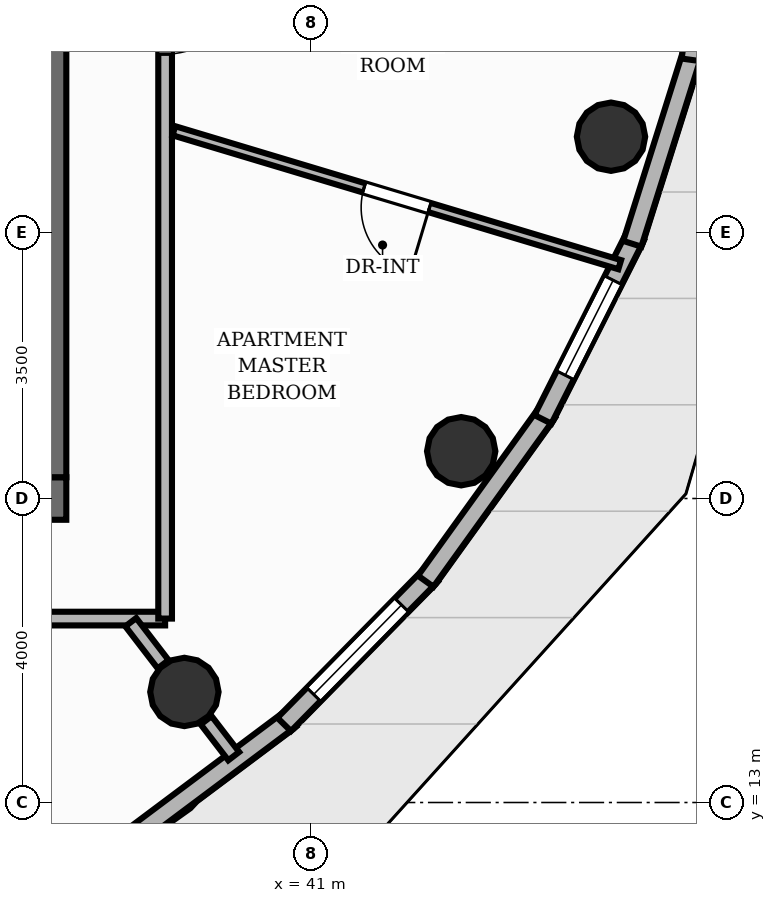
"""IFC4 building model, lengths in metres.
Left out: names, types, materials, properties, quantities, classifications, styles, units other than length and angle.
Written with IfcOpenShell. Run it as: python <this file> out.ifc"""

import sys

from ifc_helpers import new_model, si_unit, direction, frame, frame_2d, origin, origin_2d, place, context, subcontext, project, spatial, rectangle, circle, extrude, element, fill, save


model = new_model("IFC4")
c1 = context("Model", 3, precision=1e-05, world=origin(), true_north=direction((0.0, 1.0)))
c2 = subcontext(c1, "Body", "Model", "MODEL_VIEW")
j1 = project(units=[si_unit("LENGTHUNIT", "METRE"), si_unit("PLANEANGLEUNIT", "RADIAN")], contexts=[c1])
p1 = place(None, origin())
s1 = spatial("IfcSite", under=j1, at=p1, CompositionType="ELEMENT")
p2 = place(p1, origin())
s2 = spatial("IfcBuilding", under=s1, at=p2, CompositionType="ELEMENT")
p3 = place(p2, frame((0.0, 0.0, 169.44)))
s3 = spatial("IfcBuildingStorey", under=s2, at=p3, CompositionType="ELEMENT", Elevation=169.44)
p4 = place(p3, frame((26.22, 17.0, 0.0), z_axis=(0.0, 0.0, 1.0), x_axis=(1.0, 0.0, 0.0)))
e1 = element("IfcWall", 1, at=p4, inside=s3, PredefinedType="SHEAR", context=c2, shape_type="SweptSolid", body=[
    extrude(rectangle(XDim=11.56, YDim=0.56, at=frame_2d((5.78, 0.0))), origin(), (0.0, 0.0, 1.0), 3.2),
])
p5 = place(p4, frame((2.28, 0.0, 0.0)))
e2 = element("IfcOpeningElement", 2, at=p5, cuts=e1, PredefinedType="OPENING", context=c2, shape_type="SweptSolid", body=[
    extrude(rectangle(XDim=1.1, YDim=2.15, at=frame_2d((0.55, 1.075))), frame((0.0, 0.29, 0.0), z_axis=(0.0, -1.0, 0.0), x_axis=(1.0, 0.0, 0.0)), (0.0, 0.0, 1.0), 0.58),
])
p6 = place(p4, frame((5.83, 0.0, 0.0)))
e3 = element("IfcOpeningElement", 3, at=p6, cuts=e1, PredefinedType="OPENING", context=c2, shape_type="SweptSolid", body=[
    extrude(rectangle(XDim=0.9, YDim=2.1, at=frame_2d((0.45, 1.05))), frame((0.0, 0.29, 0.0), z_axis=(0.0, -1.0, 0.0), x_axis=(1.0, 0.0, 0.0)), (0.0, 0.0, 1.0), 0.58),
])
p7 = place(p3, frame((37.5, 17.28, 0.0), z_axis=(0.0, 0.0, 1.0), x_axis=(0.0, 1.0, 0.0)))
e4 = element("IfcWall", 4, at=p7, inside=s3, PredefinedType="SHEAR", context=c2, shape_type="SweptSolid", body=[
    extrude(rectangle(XDim=13.44, YDim=0.56, at=frame_2d((6.72, 0.0))), origin(), (0.0, 0.0, 1.0), 3.2),
])
for number, where, z_axis, x_axis in (
    (5, (39.333, 14.455, 0.0), (0.0, 0.0, 1.0), (1.0, 0.0, 0.0)),
    (6, (42.975, 17.622, 0.0), (0.0, 0.0, 1.0), (1.0, 0.0, 0.0)),
    (7, (44.946, 21.76, 0.0), (0.0, 0.0, 1.0), (1.0, 0.0, 0.0)),
):
    element("IfcColumn", number, at=place(p3, frame(where, z_axis=z_axis, x_axis=x_axis)), inside=s3, PredefinedType="COLUMN", context=c2, shape_type="SweptSolid", body=[
        extrude(circle(Radius=0.45, at=origin_2d()), origin(), (0.0, 0.0, 1.0), 3.2),
    ])
p8 = place(p3, frame((40.728, 14.099, 0.0), z_axis=(0.0, 0.0, 1.0), x_axis=(-0.800636941996, -0.599149803564, 0.0)))
e8 = element("IfcWall", 8, at=p8, inside=s3, PredefinedType="SOLIDWALL", context=c2, shape_type="SweptSolid", body=[
    extrude(rectangle(XDim=2.758, YDim=0.25, at=frame_2d((1.379, 0.0))), origin(), (0.0, 0.0, 1.0), 2.96),
])
p9 = place(p3, frame((42.579, 15.995, 0.0), z_axis=(0.0, 0.0, 1.0), x_axis=(-0.700794099323, -0.713363603189, 0.0)))
e9 = element("IfcWall", 9, at=p9, inside=s3, PredefinedType="SOLIDWALL", context=c2, shape_type="SweptSolid", body=[
    extrude(rectangle(XDim=2.758, YDim=0.25, at=frame_2d((1.379, 0.0))), origin(), (0.0, 0.0, 1.0), 2.96),
])
p10 = place(p9, frame((0.554, 0.0, 0.85)))
e10 = element("IfcOpeningElement", 10, at=p10, cuts=e9, PredefinedType="OPENING", context=c2, shape_type="SweptSolid", body=[
    extrude(rectangle(XDim=1.65, YDim=1.55, at=frame_2d((0.825, 0.775))), frame((0.0, 0.135, 0.0), z_axis=(0.0, -1.0, 0.0), x_axis=(1.0, 0.0, 0.0)), (0.0, 0.0, 1.0), 0.27),
])
p11 = place(p3, frame((44.108, 18.135, 0.0), z_axis=(0.0, 0.0, 1.0), x_axis=(-0.583975860001, -0.811771023711, 0.0)))
e11 = element("IfcWall", 11, at=p11, inside=s3, PredefinedType="SOLIDWALL", context=c2, shape_type="SweptSolid", body=[
    extrude(rectangle(XDim=2.738, YDim=0.25, at=frame_2d((1.369, 0.0))), origin(), (0.0, 0.0, 1.0), 2.96),
])
p12 = place(p3, frame((45.268, 20.453, 0.0), z_axis=(0.0, 0.0, 1.0), x_axis=(-0.450391703917, -0.892831066352, 0.0)))
e12 = element("IfcWall", 12, at=p12, inside=s3, PredefinedType="SOLIDWALL", context=c2, shape_type="SweptSolid", body=[
    extrude(rectangle(XDim=2.702, YDim=0.25, at=frame_2d((1.351, 0.0))), origin(), (0.0, 0.0, 1.0), 2.96),
])
p13 = place(p12, frame((0.651, 0.0, 0.85)))
e13 = element("IfcOpeningElement", 13, at=p13, cuts=e12, PredefinedType="OPENING", context=c2, shape_type="SweptSolid", body=[
    extrude(rectangle(XDim=1.4, YDim=1.55, at=frame_2d((0.7, 0.775))), frame((0.0, 0.135, 0.0), z_axis=(0.0, -1.0, 0.0), x_axis=(1.0, 0.0, 0.0)), (0.0, 0.0, 1.0), 0.27),
])
p14 = place(p3, frame((46.024, 22.88, 0.0), z_axis=(0.0, 0.0, 1.0), x_axis=(-0.300796358401, -0.953688392911, 0.0)))
e14 = element("IfcWall", 14, at=p14, inside=s3, PredefinedType="SOLIDWALL", context=c2, shape_type="SweptSolid", body=[
    extrude(rectangle(XDim=2.651, YDim=0.25, at=frame_2d((1.325, 0.0))), origin(), (0.0, 0.0, 1.0), 2.96),
])
p15 = place(p3, frame((46.353, 25.34, 0.0), z_axis=(0.0, 0.0, 1.0), x_axis=(-0.136289981327, -0.990668986589, 0.0)))
e15 = element("IfcWall", 15, at=p15, inside=s3, PredefinedType="SOLIDWALL", context=c2, shape_type="SweptSolid", body=[
    extrude(rectangle(XDim=2.592, YDim=0.25, at=frame_2d((1.296, 0.0))), origin(), (0.0, 0.0, 1.0), 2.96),
])
p16 = place(p15, frame((1.098, 0.0, 0.85)))
e16 = element("IfcOpeningElement", 16, at=p16, cuts=e15, PredefinedType="OPENING", context=c2, shape_type="SweptSolid", body=[
    extrude(rectangle(XDim=0.95, YDim=1.45, at=frame_2d((0.475, 0.725))), frame((0.0, 0.135, 0.0), z_axis=(0.0, -1.0, 0.0), x_axis=(1.0, 0.0, 0.0)), (0.0, 0.0, 1.0), 0.27),
])
p17 = place(p3, frame((39.62, 14.082, 0.0), z_axis=(0.0, 0.0, 1.0), x_axis=(0.609274747308, -0.792959193334, 0.0)))
e17 = element("IfcWall", 17, at=p17, inside=s3, PredefinedType="PARTITIONING", context=c2, shape_type="SweptSolid", body=[
    extrude(rectangle(XDim=0.595, YDim=0.18, at=frame_2d((0.298, 0.0))), origin(), (0.0, 0.0, 1.0), 2.404),
])
p18 = place(p3, frame((39.08, 15.42, 0.0), z_axis=(0.0, 0.0, 1.0), x_axis=(-1.0, 0.0, 0.0)))
e18 = element("IfcWall", 18, at=p18, inside=s3, PredefinedType="PARTITIONING", context=c2, shape_type="SweptSolid", body=[
    extrude(rectangle(XDim=14.16, YDim=0.18, at=frame_2d((7.08, 0.0))), origin(), (0.0, 0.0, 1.0), 2.955),
])
p19 = place(p18, frame((2.007, 0.0, 0.0)))
e19 = element("IfcOpeningElement", 19, at=p19, cuts=e18, PredefinedType="OPENING", context=c2, shape_type="SweptSolid", body=[
    extrude(rectangle(XDim=0.9, YDim=2.1, at=frame_2d((0.45, 1.05))), frame((0.0, 0.1, 0.0), z_axis=(0.0, -1.0, 0.0), x_axis=(1.0, 0.0, 0.0)), (0.0, 0.0, 1.0), 0.2),
])
p20 = place(p18, frame((6.287, 0.0, 0.0)))
e20 = element("IfcOpeningElement", 20, at=p20, cuts=e18, PredefinedType="OPENING", context=c2, shape_type="SweptSolid", body=[
    extrude(rectangle(XDim=0.9, YDim=2.1, at=frame_2d((0.45, 1.05))), frame((0.0, 0.1, 0.0), z_axis=(0.0, -1.0, 0.0), x_axis=(1.0, 0.0, 0.0)), (0.0, 0.0, 1.0), 0.2),
])
p21 = place(p3, frame((39.08, 30.248, 0.0), z_axis=(0.0, 0.0, 1.0), x_axis=(0.0, -1.0, 0.0)))
e21 = element("IfcWall", 21, at=p21, inside=s3, PredefinedType="PARTITIONING", context=c2, shape_type="SweptSolid", body=[
    extrude(rectangle(XDim=14.828, YDim=0.18, at=frame_2d((7.414, 0.0))), origin(), (0.0, 0.0, 1.0), 2.955),
])
p22 = place(p21, frame((6.351, 0.0, 0.0)))
e22 = element("IfcOpeningElement", 22, at=p22, cuts=e21, PredefinedType="OPENING", context=c2, shape_type="SweptSolid", body=[
    extrude(rectangle(XDim=1.05, YDim=2.15, at=frame_2d((0.525, 1.075))), frame((0.0, 0.1, 0.0), z_axis=(0.0, -1.0, 0.0), x_axis=(1.0, 0.0, 0.0)), (0.0, 0.0, 1.0), 0.2),
])
p23 = place(p3, frame((38.628, 15.372, 0.0), z_axis=(0.0, 0.0, 1.0), x_axis=(0.609304996033, -0.792935950635, 0.0)))
e23 = element("IfcWall", 23, at=p23, inside=s3, PredefinedType="PARTITIONING", context=c2, shape_type="SweptSolid", body=[
    extrude(rectangle(XDim=0.698, YDim=0.18, at=frame_2d((0.349, 0.0))), origin(), (0.0, 0.0, 1.0), 2.404),
])
p24 = place(p3, frame((45.061, 20.077, 0.0), z_axis=(0.0, 0.0, 1.0), x_axis=(-0.957731888454, 0.287662353878, 0.0)))
e24 = element("IfcWall", 24, at=p24, inside=s3, PredefinedType="PARTITIONING", context=c2, shape_type="SweptSolid", body=[
    extrude(rectangle(XDim=6.125, YDim=0.125, at=frame_2d((3.062, 0.0))), origin(), (0.0, 0.0, 1.0), 2.692),
])
p25 = place(p24, frame((2.613, 0.0, 0.0)))
e25 = element("IfcOpeningElement", 25, at=p25, cuts=e24, PredefinedType="OPENING", context=c2, shape_type="SweptSolid", body=[
    extrude(rectangle(XDim=0.9, YDim=2.1, at=frame_2d((0.45, 1.05))), frame((0.0, 0.073, 0.0), z_axis=(0.0, -1.0, 0.0), x_axis=(1.0, 0.0, 0.0)), (0.0, 0.0, 1.0), 0.145),
])
p26 = place(p10, origin())
e26 = element("IfcWindow", 26, at=p26, inside=s3, PartitioningType="SINGLE_PANEL", PredefinedType="WINDOW", context=c2, shape_type="SweptSolid", body=[
    extrude(rectangle(XDim=1.65, YDim=1.55, at=frame_2d((0.825, 0.775))), frame((0.0, 0.03, 0.0), z_axis=(0.0, -1.0, 0.0), x_axis=(1.0, 0.0, 0.0)), (0.0, 0.0, 1.0), 0.06),
])
fill(e10, e26)
p27 = place(p13, origin())
e27 = element("IfcWindow", 27, at=p27, inside=s3, PartitioningType="SINGLE_PANEL", PredefinedType="WINDOW", context=c2, shape_type="SweptSolid", body=[
    extrude(rectangle(XDim=1.4, YDim=1.55, at=frame_2d((0.7, 0.775))), frame((0.0, 0.03, 0.0), z_axis=(0.0, -1.0, 0.0), x_axis=(1.0, 0.0, 0.0)), (0.0, 0.0, 1.0), 0.06),
])
fill(e13, e27)
p28 = place(p22, origin())
e28 = element("IfcDoor", 28, at=p28, inside=s3, OperationType="SINGLE_SWING_LEFT", PredefinedType="DOOR", context=c2, shape_type="SweptSolid", body=[
    extrude(rectangle(XDim=1.05, YDim=2.15, at=frame_2d((0.525, 1.075))), frame((0.0, 0.025, 0.0), z_axis=(0.0, -1.0, 0.0), x_axis=(1.0, 0.0, 0.0)), (0.0, 0.0, 1.0), 0.05),
])
fill(e22, e28)
p29 = place(p25, origin())
e29 = element("IfcDoor", 29, at=p29, inside=s3, OperationType="SINGLE_SWING_LEFT", PredefinedType="DOOR", context=c2, shape_type="SweptSolid", body=[
    extrude(rectangle(XDim=0.9, YDim=2.1, at=frame_2d((0.45, 1.05))), frame((0.0, 0.025, 0.0), z_axis=(0.0, -1.0, 0.0), x_axis=(1.0, 0.0, 0.0)), (0.0, 0.0, 1.0), 0.05),
])
fill(e25, e29)
save(model, sys.argv[1])
